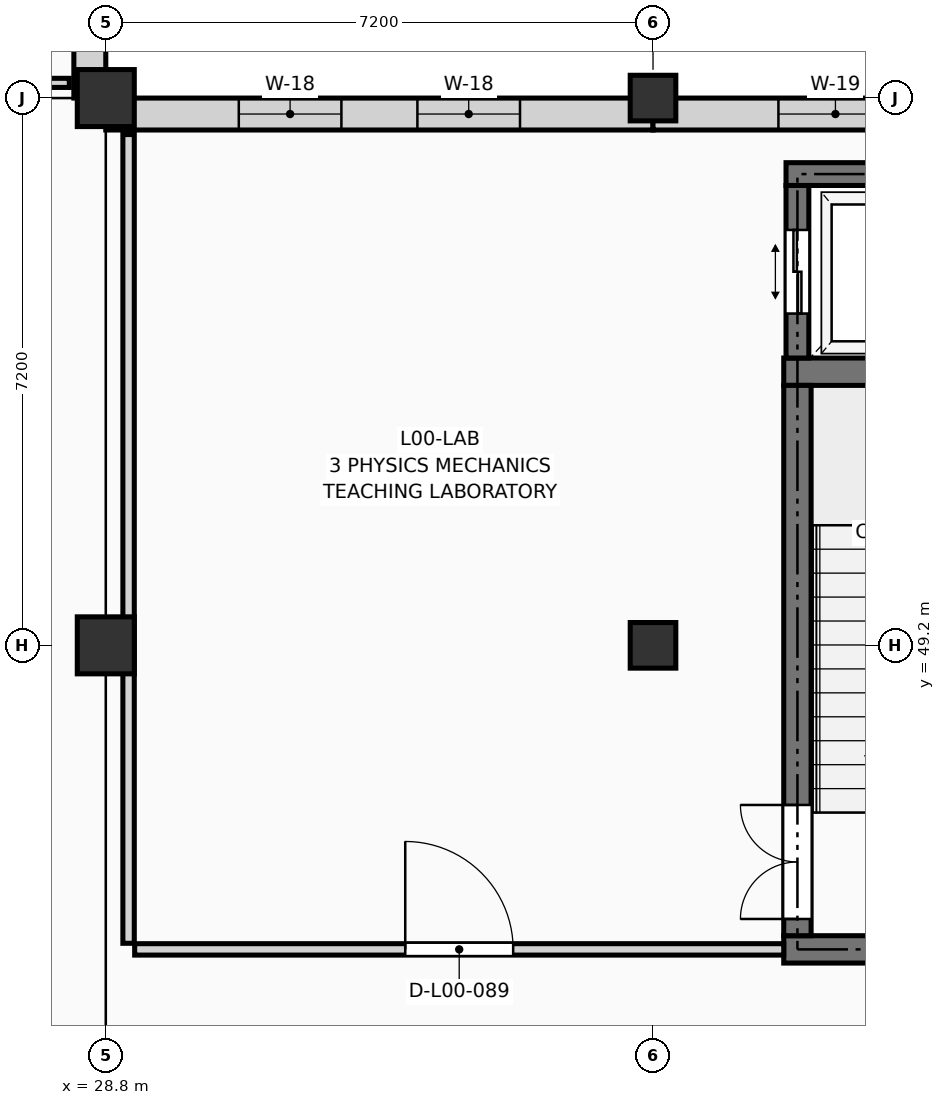
"""IFC4 building model, lengths in metres.
Left out: names, types, materials, properties, quantities, classifications, styles, units other than length and angle.
Written with IfcOpenShell. Run it as: python <this file> out.ifc"""

import sys

from ifc_helpers import new_model, si_unit, direction, frame, frame_2d, origin, origin_2d, place, context, subcontext, project, spatial, rectangle, extrude, element, fill, save


model = new_model("IFC4")
c1 = context("Model", 3, precision=1e-05, world=origin(), true_north=direction((0.0, 1.0)))
c2 = subcontext(c1, "Body", "Model", "MODEL_VIEW")
j1 = project(units=[si_unit("LENGTHUNIT", "METRE"), si_unit("PLANEANGLEUNIT", "RADIAN")], contexts=[c1])
p1 = place(None, origin())
s1 = spatial("IfcSite", under=j1, at=p1, CompositionType="ELEMENT")
p2 = place(p1, origin())
s2 = spatial("IfcBuilding", under=s1, at=p2, CompositionType="ELEMENT")
p3 = place(p2, origin())
s3 = spatial("IfcBuildingStorey", under=s2, at=p3, CompositionType="ELEMENT", Elevation=0.0)
for number, where, z_axis, x_axis in (
    (1, (28.8, 49.2, 0.0), (0.0, 0.0, 1.0), (1.0, 0.0, 0.0)),
    (2, (28.8, 56.4, 0.0), (0.0, 0.0, 1.0), (1.0, 0.0, 0.0)),
):
    element("IfcColumn", number, at=place(p3, frame(where, z_axis=z_axis, x_axis=x_axis)), inside=s3, PredefinedType="COLUMN", context=c2, shape_type="SweptSolid", body=[
        extrude(rectangle(XDim=0.75, YDim=0.75, at=origin_2d()), origin(), (0.0, 0.0, 1.0), 4.5),
    ])
for number, where, z_axis, x_axis in (
    (3, (36.0, 49.2, 0.0), (0.0, 0.0, 1.0), (1.0, 0.0, 0.0)),
    (4, (36.0, 56.4, 0.0), (0.0, 0.0, 1.0), (1.0, 0.0, 0.0)),
):
    element("IfcColumn", number, at=place(p3, frame(where, z_axis=z_axis, x_axis=x_axis)), inside=s3, PredefinedType="COLUMN", context=c2, shape_type="SweptSolid", body=[
        extrude(rectangle(XDim=0.6, YDim=0.6, at=origin_2d()), origin(), (0.0, 0.0, 1.0), 4.5),
    ])
p4 = place(p3, frame((28.59, 56.4, 0.0), z_axis=(0.0, 0.0, 1.0), x_axis=(0.0, 1.0, 0.0)))
e5 = element("IfcWall", 5, at=p4, inside=s3, PredefinedType="SOLIDWALL", context=c2, shape_type="SweptSolid", body=[
    extrude(rectangle(XDim=7.2, YDim=0.42, at=frame_2d((3.6, 0.0))), origin(), (0.0, 0.0, 1.0), 3.62),
])
p5 = place(p4, frame((1.683, 0.0, 0.45)))
e6 = element("IfcOpeningElement", 6, at=p5, cuts=e5, PredefinedType="OPENING", context=c2, shape_type="SweptSolid", body=[
    extrude(rectangle(XDim=1.45, YDim=2.5, at=frame_2d((0.725, 1.25))), frame((0.0, 0.222, 0.0), z_axis=(0.0, -1.0, 0.0), x_axis=(1.0, 0.0, 0.0)), (0.0, 0.0, 1.0), 0.444),
])
p6 = place(p4, frame((4.067, 0.0, 0.45)))
e7 = element("IfcOpeningElement", 7, at=p6, cuts=e5, PredefinedType="OPENING", context=c2, shape_type="SweptSolid", body=[
    extrude(rectangle(XDim=1.45, YDim=2.5, at=frame_2d((0.725, 1.25))), frame((0.0, 0.222, 0.0), z_axis=(0.0, -1.0, 0.0), x_axis=(1.0, 0.0, 0.0)), (0.0, 0.0, 1.0), 0.444),
])
p7 = place(p3, frame((28.8, 56.19, 0.0), z_axis=(0.0, 0.0, 1.0), x_axis=(1.0, 0.0, 0.0)))
e8 = element("IfcWall", 8, at=p7, inside=s3, PredefinedType="SOLIDWALL", context=c2, shape_type="SweptSolid", body=[
    extrude(rectangle(XDim=7.2, YDim=0.42, at=frame_2d((3.6, 0.0))), origin(), (0.0, 0.0, 1.0), 3.62),
])
p8 = place(p7, frame((1.75, 0.0, 0.45)))
e9 = element("IfcOpeningElement", 9, at=p8, cuts=e8, PredefinedType="OPENING", context=c2, shape_type="SweptSolid", body=[
    extrude(rectangle(XDim=1.35, YDim=2.45, at=frame_2d((0.675, 1.225))), frame((0.0, 0.222, 0.0), z_axis=(0.0, -1.0, 0.0), x_axis=(1.0, 0.0, 0.0)), (0.0, 0.0, 1.0), 0.444),
])
p9 = place(p7, frame((4.1, 0.0, 0.45)))
e10 = element("IfcOpeningElement", 10, at=p9, cuts=e8, PredefinedType="OPENING", context=c2, shape_type="SweptSolid", body=[
    extrude(rectangle(XDim=1.35, YDim=2.45, at=frame_2d((0.675, 1.225))), frame((0.0, 0.222, 0.0), z_axis=(0.0, -1.0, 0.0), x_axis=(1.0, 0.0, 0.0)), (0.0, 0.0, 1.0), 0.444),
])
p10 = place(p3, frame((36.0, 56.19, 0.0), z_axis=(0.0, 0.0, 1.0), x_axis=(1.0, 0.0, 0.0)))
e11 = element("IfcWall", 11, at=p10, inside=s3, PredefinedType="SOLIDWALL", context=c2, shape_type="SweptSolid", body=[
    extrude(rectangle(XDim=7.2, YDim=0.42, at=frame_2d((3.6, 0.0))), origin(), (0.0, 0.0, 1.0), 3.62),
])
p11 = place(p10, frame((1.65, 0.0, 0.45)))
e12 = element("IfcOpeningElement", 12, at=p11, cuts=e11, PredefinedType="OPENING", context=c2, shape_type="SweptSolid", body=[
    extrude(rectangle(XDim=1.5, YDim=2.4, at=frame_2d((0.75, 1.2))), frame((0.0, 0.222, 0.0), z_axis=(0.0, -1.0, 0.0), x_axis=(1.0, 0.0, 0.0)), (0.0, 0.0, 1.0), 0.444),
])
p12 = place(p10, frame((4.05, 0.0, 0.45)))
e13 = element("IfcOpeningElement", 13, at=p12, cuts=e11, PredefinedType="OPENING", context=c2, shape_type="SweptSolid", body=[
    extrude(rectangle(XDim=1.5, YDim=2.4, at=frame_2d((0.75, 1.2))), frame((0.0, 0.222, 0.0), z_axis=(0.0, -1.0, 0.0), x_axis=(1.0, 0.0, 0.0)), (0.0, 0.0, 1.0), 0.444),
])
for number, where, z_axis, x_axis in (
    (14, (37.72, 45.2, 0.0), (0.0, 0.0, 1.0), (1.0, 0.0, 0.0)),
    (15, (37.72, 52.8, 0.0), (0.0, 0.0, 1.0), (1.0, 0.0, 0.0)),
):
    element("IfcWall", number, at=place(p3, frame(where, z_axis=z_axis, x_axis=x_axis)), inside=s3, PredefinedType="SHEAR", context=c2, shape_type="SweptSolid", body=[
        extrude(rectangle(XDim=4.48, YDim=0.36, at=frame_2d((2.24, 0.0))), origin(), (0.0, 0.0, 1.0), 4.25),
    ])
p13 = place(p3, frame((37.9, 45.38, 0.0), z_axis=(0.0, 0.0, 1.0), x_axis=(0.0, 1.0, 0.0)))
e16 = element("IfcWall", 16, at=p13, inside=s3, PredefinedType="SHEAR", context=c2, shape_type="SweptSolid", body=[
    extrude(rectangle(XDim=7.24, YDim=0.36, at=frame_2d((3.62, 0.0))), origin(), (0.0, 0.0, 1.0), 4.25),
])
p14 = place(p13, frame((0.22, 0.0, 0.0)))
e17 = element("IfcOpeningElement", 17, at=p14, cuts=e16, PredefinedType="OPENING", context=c2, shape_type="SweptSolid", body=[
    extrude(rectangle(XDim=1.5, YDim=2.2, at=frame_2d((0.75, 1.1))), frame((0.0, 0.192, 0.0), z_axis=(0.0, -1.0, 0.0), x_axis=(1.0, 0.0, 0.0)), (0.0, 0.0, 1.0), 0.384),
])
p15 = place(p3, frame((37.75, 55.4, 0.0), z_axis=(0.0, 0.0, 1.0), x_axis=(1.0, 0.0, 0.0)))
e18 = element("IfcWall", 18, at=p15, inside=s3, PredefinedType="SHEAR", context=c2, shape_type="SweptSolid", body=[
    extrude(rectangle(XDim=2.7, YDim=0.3, at=frame_2d((1.35, 0.0))), origin(), (0.0, 0.0, 1.0), 4.25),
])
p16 = place(p3, frame((37.9, 52.98, 0.0), z_axis=(0.0, 0.0, 1.0), x_axis=(0.0, 1.0, 0.0)))
e19 = element("IfcWall", 19, at=p16, inside=s3, PredefinedType="SHEAR", context=c2, shape_type="SweptSolid", body=[
    extrude(rectangle(XDim=2.27, YDim=0.3, at=frame_2d((1.135, 0.0))), origin(), (0.0, 0.0, 1.0), 4.25),
])
p17 = place(p16, frame((0.585, 0.0, 0.0)))
e20 = element("IfcOpeningElement", 20, at=p17, cuts=e19, PredefinedType="OPENING", context=c2, shape_type="SweptSolid", body=[
    extrude(rectangle(XDim=1.1, YDim=2.2, at=frame_2d((0.55, 1.1))), frame((0.0, 0.162, 0.0), z_axis=(0.0, -1.0, 0.0), x_axis=(1.0, 0.0, 0.0)), (0.0, 0.0, 1.0), 0.324),
])
p18 = place(p3, frame((29.1, 45.28, 0.0), z_axis=(0.0, 0.0, 1.0), x_axis=(0.0, 1.0, 0.0)))
e21 = element("IfcWall", 21, at=p18, inside=s3, PredefinedType="PARTITIONING", context=c2, shape_type="SweptSolid", body=[
    extrude(rectangle(XDim=10.64, YDim=0.15, at=frame_2d((5.32, 0.0))), origin(), (0.0, 0.0, 1.0), 3.385),
])
p19 = place(p3, frame((29.18, 45.2, 0.0), z_axis=(0.0, 0.0, 1.0), x_axis=(1.0, 0.0, 0.0)))
e22 = element("IfcWall", 22, at=p19, inside=s3, PredefinedType="PARTITIONING", context=c2, shape_type="SweptSolid", body=[
    extrude(rectangle(XDim=8.54, YDim=0.15, at=frame_2d((4.27, 0.0))), origin(), (0.0, 0.0, 1.0), 4.235),
])
p20 = place(p19, frame((3.56, 0.0, 0.0)))
e23 = element("IfcOpeningElement", 23, at=p20, cuts=e22, PredefinedType="OPENING", context=c2, shape_type="SweptSolid", body=[
    extrude(rectangle(XDim=1.42, YDim=2.22, at=frame_2d((0.71, 1.11))), frame((0.0, 0.087, 0.0), z_axis=(0.0, -1.0, 0.0), x_axis=(1.0, 0.0, 0.0)), (0.0, 0.0, 1.0), 0.174),
])
p21 = place(p3, frame((16.08, 56.6, 0.0), z_axis=(0.0, 0.0, 1.0), x_axis=(1.0, 0.0, 0.0)))
e24 = element("IfcWall", 24, at=p21, inside=s3, PredefinedType="PARTITIONING", context=c2, shape_type="SweptSolid", body=[
    extrude(rectangle(XDim=12.24, YDim=0.12, at=frame_2d((6.12, 0.0))), origin(), (0.0, 0.0, 1.0), 3.485),
])
p22 = place(p8, origin())
e25 = element("IfcWindow", 25, at=p22, inside=s3, PartitioningType="SINGLE_PANEL", PredefinedType="WINDOW", context=c2, shape_type="SweptSolid", body=[
    extrude(rectangle(XDim=1.35, YDim=2.45, at=frame_2d((0.675, 1.225))), frame((0.0, 0.03, 0.0), z_axis=(0.0, -1.0, 0.0), x_axis=(1.0, 0.0, 0.0)), (0.0, 0.0, 1.0), 0.06),
])
fill(e9, e25)
p23 = place(p9, origin())
e26 = element("IfcWindow", 26, at=p23, inside=s3, PartitioningType="SINGLE_PANEL", PredefinedType="WINDOW", context=c2, shape_type="SweptSolid", body=[
    extrude(rectangle(XDim=1.35, YDim=2.45, at=frame_2d((0.675, 1.225))), frame((0.0, 0.03, 0.0), z_axis=(0.0, -1.0, 0.0), x_axis=(1.0, 0.0, 0.0)), (0.0, 0.0, 1.0), 0.06),
])
fill(e10, e26)
p24 = place(p11, origin())
e27 = element("IfcWindow", 27, at=p24, inside=s3, PartitioningType="SINGLE_PANEL", PredefinedType="WINDOW", context=c2, shape_type="SweptSolid", body=[
    extrude(rectangle(XDim=1.5, YDim=2.4, at=frame_2d((0.75, 1.2))), frame((0.0, 0.03, 0.0), z_axis=(0.0, -1.0, 0.0), x_axis=(1.0, 0.0, 0.0)), (0.0, 0.0, 1.0), 0.06),
])
fill(e12, e27)
p25 = place(p14, origin())
e28 = element("IfcDoor", 28, at=p25, inside=s3, OperationType="DOUBLE_DOOR_SINGLE_SWING", PredefinedType="DOOR", context=c2, shape_type="SweptSolid", body=[
    extrude(rectangle(XDim=1.5, YDim=2.2, at=frame_2d((0.75, 1.1))), frame((0.0, 0.025, 0.0), z_axis=(0.0, -1.0, 0.0), x_axis=(1.0, 0.0, 0.0)), (0.0, 0.0, 1.0), 0.05),
])
fill(e17, e28)
p26 = place(p17, origin())
e29 = element("IfcDoor", 29, at=p26, inside=s3, OperationType="DOUBLE_DOOR_SLIDING", PredefinedType="DOOR", context=c2, shape_type="SweptSolid", body=[
    extrude(rectangle(XDim=1.1, YDim=2.2, at=frame_2d((0.55, 1.1))), frame((0.0, 0.025, 0.0), z_axis=(0.0, -1.0, 0.0), x_axis=(1.0, 0.0, 0.0)), (0.0, 0.0, 1.0), 0.05),
])
fill(e20, e29)
p27 = place(p20, origin())
e30 = element("IfcDoor", 30, at=p27, inside=s3, OperationType="SINGLE_SWING_LEFT", PredefinedType="DOOR", context=c2, shape_type="SweptSolid", body=[
    extrude(rectangle(XDim=1.42, YDim=2.22, at=frame_2d((0.71, 1.11))), frame((0.0, 0.025, 0.0), z_axis=(0.0, -1.0, 0.0), x_axis=(1.0, 0.0, 0.0)), (0.0, 0.0, 1.0), 0.05),
])
fill(e23, e30)
save(model, sys.argv[1])
